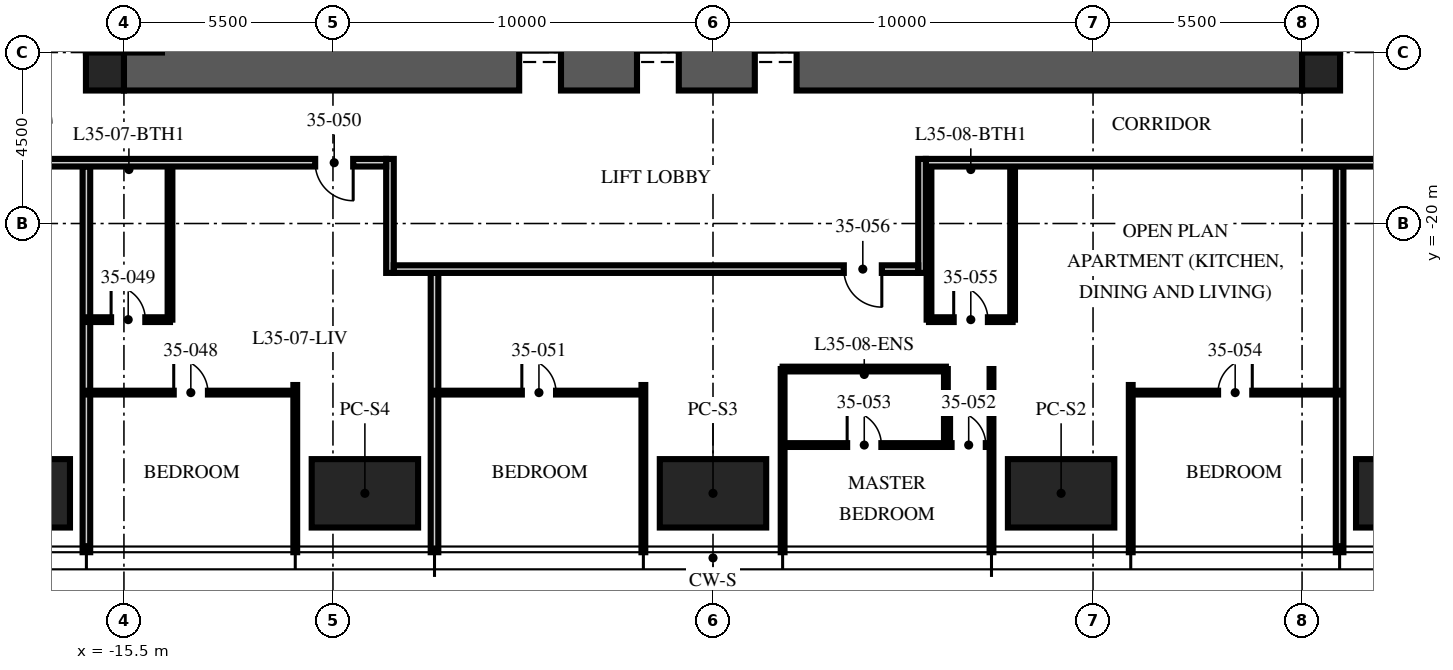
"""IFC4 building model, lengths in metres.
Left out: names, types, materials, properties, quantities, classifications, styles, units other than length and angle.
Written with IfcOpenShell. Run it as: python <this file> out.ifc"""

import sys

from ifc_helpers import new_model, si_unit, direction, frame, frame_2d, origin, origin_2d, place, context, subcontext, project, spatial, rectangle, extrude, element, fill, save


model = new_model("IFC4")
c1 = context("Model", 3, precision=1e-05, world=origin(), true_north=direction((0.0, 1.0)))
c2 = subcontext(c1, "Body", "Model", "MODEL_VIEW")
j1 = project(units=[si_unit("LENGTHUNIT", "METRE"), si_unit("PLANEANGLEUNIT", "RADIAN")], contexts=[c1])
p1 = place(None, origin())
s1 = spatial("IfcSite", under=j1, at=p1, CompositionType="ELEMENT")
p2 = place(p1, origin())
s2 = spatial("IfcBuilding", under=s1, at=p2, CompositionType="ELEMENT")
p3 = place(p2, frame((0.0, 0.0, 141.0)))
s3 = spatial("IfcBuildingStorey", under=s2, at=p3, CompositionType="ELEMENT", Elevation=141.0)
p4 = place(p3, frame((-15.5, -15.5, -0.25), z_axis=(0.0, 0.0, 1.0), x_axis=(1.0, 0.0, 0.0)))
e1 = element("IfcWall", 1, at=p4, inside=s3, PredefinedType="SHEAR", context=c2, shape_type="SweptSolid", body=[
    extrude(rectangle(XDim=31.0, YDim=2.0, at=frame_2d((15.5, 0.0))), origin(), (0.0, 0.0, 1.0), 3.75),
])
p5 = place(p4, frame((10.4, 0.0, 0.25)))
e2 = element("IfcOpeningElement", 2, at=p5, cuts=e1, PredefinedType="OPENING", context=c2, shape_type="SweptSolid", body=[
    extrude(rectangle(XDim=1.1, YDim=2.1, at=frame_2d((0.55, 1.05))), frame((0.0, 1.01, 0.0), z_axis=(0.0, -1.0, 0.0), x_axis=(1.0, 0.0, 0.0)), (0.0, 0.0, 1.0), 2.02),
])
p6 = place(p4, frame((13.5, 0.0, 0.25)))
e3 = element("IfcOpeningElement", 3, at=p6, cuts=e1, PredefinedType="OPENING", context=c2, shape_type="SweptSolid", body=[
    extrude(rectangle(XDim=1.1, YDim=2.1, at=frame_2d((0.55, 1.05))), frame((0.0, 1.01, 0.0), z_axis=(0.0, -1.0, 0.0), x_axis=(1.0, 0.0, 0.0)), (0.0, 0.0, 1.0), 2.02),
])
p7 = place(p4, frame((16.6, 0.0, 0.25)))
e4 = element("IfcOpeningElement", 4, at=p7, cuts=e1, PredefinedType="OPENING", context=c2, shape_type="SweptSolid", body=[
    extrude(rectangle(XDim=1.1, YDim=2.1, at=frame_2d((0.55, 1.05))), frame((0.0, 1.01, 0.0), z_axis=(0.0, -1.0, 0.0), x_axis=(1.0, 0.0, 0.0)), (0.0, 0.0, 1.0), 2.02),
])
for number, where, z_axis, x_axis in (
    (5, (-16.0, -16.0, -0.25), (0.0, 0.0, 1.0), (1.0, 0.0, 0.0)),
    (6, (16.0, -16.0, -0.25), (0.0, 0.0, 1.0), (1.0, 0.0, 0.0)),
):
    element("IfcColumn", number, at=place(p3, frame(where, z_axis=z_axis, x_axis=x_axis)), inside=s3, PredefinedType="COLUMN", context=c2, shape_type="SweptSolid", body=[
        extrude(rectangle(XDim=1.0, YDim=1.0, at=origin_2d()), origin(), (0.0, 0.0, 1.0), 3.75),
    ])
for number, where, z_axis, x_axis in (
    (7, (18.32, -27.1, 0.0), (0.0, 0.0, 1.0), (1.0, 0.0, 0.0)),
    (8, (9.16, -27.1, 0.0), (0.0, 0.0, 1.0), (1.0, 0.0, 0.0)),
    (9, (0.0, -27.1, 0.0), (0.0, 0.0, 1.0), (1.0, 0.0, 0.0)),
    (10, (-9.16, -27.1, 0.0), (0.0, 0.0, 1.0), (1.0, 0.0, 0.0)),
    (11, (-18.32, -27.1, 0.0), (0.0, 0.0, 1.0), (1.0, 0.0, 0.0)),
):
    element("IfcColumn", number, at=place(p3, frame(where, z_axis=z_axis, x_axis=x_axis)), inside=s3, PredefinedType="COLUMN", context=c2, shape_type="SweptSolid", body=[
        extrude(rectangle(XDim=2.8, YDim=1.8, at=origin_2d()), origin(), (0.0, 0.0, 1.0), 3.75),
    ])
p8 = place(p3, frame((-16.488, -18.5, 0.0), z_axis=(0.0, 0.0, 1.0), x_axis=(0.0, -1.0, 0.0)))
e12 = element("IfcWall", 12, at=p8, inside=s3, PredefinedType="PARTITIONING", context=c2, shape_type="SweptSolid", body=[
    extrude(rectangle(XDim=10.15, YDim=0.2, at=frame_2d((5.075, 0.0))), origin(), (0.0, 0.0, 1.0), 2.81),
])
p9 = place(p3, frame((-10.992, -24.25, 0.0), z_axis=(0.0, 0.0, 1.0), x_axis=(0.0, -1.0, 0.0)))
e13 = element("IfcWall", 13, at=p9, inside=s3, PredefinedType="PARTITIONING", context=c2, shape_type="SweptSolid", body=[
    extrude(rectangle(XDim=4.4, YDim=0.1, at=frame_2d((2.2, 0.0))), origin(), (0.0, 0.0, 1.0), 2.81),
])
p10 = place(p3, frame((-7.328, -21.3, 0.0), z_axis=(0.0, 0.0, 1.0), x_axis=(0.0, -1.0, 0.0)))
e14 = element("IfcWall", 14, at=p10, inside=s3, PredefinedType="PARTITIONING", context=c2, shape_type="SweptSolid", body=[
    extrude(rectangle(XDim=7.35, YDim=0.2, at=frame_2d((3.675, 0.0))), origin(), (0.0, 0.0, 1.0), 2.81),
])
p11 = place(p3, frame((-1.832, -24.25, 0.0), z_axis=(0.0, 0.0, 1.0), x_axis=(0.0, -1.0, 0.0)))
e15 = element("IfcWall", 15, at=p11, inside=s3, PredefinedType="PARTITIONING", context=c2, shape_type="SweptSolid", body=[
    extrude(rectangle(XDim=4.4, YDim=0.1, at=frame_2d((2.2, 0.0))), origin(), (0.0, 0.0, 1.0), 2.81),
])
for number, where, z_axis, x_axis in (
    (16, (1.832, -23.83, 0.0), (0.0, 0.0, 1.0), (0.0, -1.0, 0.0)),
    (17, (7.328, -23.83, 0.0), (0.0, 0.0, 1.0), (0.0, -1.0, 0.0)),
):
    element("IfcWall", number, at=place(p3, frame(where, z_axis=z_axis, x_axis=x_axis)), inside=s3, PredefinedType="PARTITIONING", context=c2, shape_type="SweptSolid", body=[
        extrude(rectangle(XDim=4.82, YDim=0.1, at=frame_2d((2.41, 0.0))), origin(), (0.0, 0.0, 1.0), 2.81),
    ])
p12 = place(p3, frame((10.992, -24.25, 0.0), z_axis=(0.0, 0.0, 1.0), x_axis=(0.0, -1.0, 0.0)))
e18 = element("IfcWall", 18, at=p12, inside=s3, PredefinedType="PARTITIONING", context=c2, shape_type="SweptSolid", body=[
    extrude(rectangle(XDim=4.4, YDim=0.1, at=frame_2d((2.2, 0.0))), origin(), (0.0, 0.0, 1.0), 2.81),
])
p13 = place(p3, frame((16.488, -18.5, 0.0), z_axis=(0.0, 0.0, 1.0), x_axis=(0.0, -1.0, 0.0)))
e19 = element("IfcWall", 19, at=p13, inside=s3, PredefinedType="PARTITIONING", context=c2, shape_type="SweptSolid", body=[
    extrude(rectangle(XDim=10.15, YDim=0.2, at=frame_2d((5.075, 0.0))), origin(), (0.0, 0.0, 1.0), 2.81),
])
p14 = place(p3, frame((-16.488, -24.45, 0.0), z_axis=(0.0, 0.0, 1.0), x_axis=(1.0, 0.0, 0.0)))
e20 = element("IfcWall", 20, at=p14, inside=s3, PredefinedType="PARTITIONING", context=c2, shape_type="SweptSolid", body=[
    extrude(rectangle(XDim=5.496, YDim=0.1, at=frame_2d((2.748, 0.0))), origin(), (0.0, 0.0, 1.0), 2.81),
])
p15 = place(p14, frame((2.298, 0.0, 0.0)))
e21 = element("IfcOpeningElement", 21, at=p15, cuts=e20, PredefinedType="OPENING", context=c2, shape_type="SweptSolid", body=[
    extrude(rectangle(XDim=0.9, YDim=2.1, at=frame_2d((0.45, 1.05))), frame((0.0, 0.06, 0.0), z_axis=(0.0, -1.0, 0.0), x_axis=(1.0, 0.0, 0.0)), (0.0, 0.0, 1.0), 0.12),
])
p16 = place(p3, frame((-16.488, -22.53, 0.0), z_axis=(0.0, 0.0, 1.0), x_axis=(1.0, 0.0, 0.0)))
e22 = element("IfcWall", 22, at=p16, inside=s3, PredefinedType="PARTITIONING", context=c2, shape_type="SweptSolid", body=[
    extrude(rectangle(XDim=2.2, YDim=0.125, at=frame_2d((1.1, 0.0))), origin(), (0.0, 0.0, 1.0), 3.5),
])
p17 = place(p16, frame((0.65, 0.0, 0.0)))
e23 = element("IfcOpeningElement", 23, at=p17, cuts=e22, PredefinedType="OPENING", context=c2, shape_type="SweptSolid", body=[
    extrude(rectangle(XDim=0.9, YDim=2.1, at=frame_2d((0.45, 1.05))), frame((0.0, 0.073, 0.0), z_axis=(0.0, -1.0, 0.0), x_axis=(1.0, 0.0, 0.0)), (0.0, 0.0, 1.0), 0.145),
])
p18 = place(p3, frame((-14.288, -18.5, 0.0), z_axis=(0.0, 0.0, 1.0), x_axis=(0.0, -1.0, 0.0)))
e24 = element("IfcWall", 24, at=p18, inside=s3, PredefinedType="PARTITIONING", context=c2, shape_type="SweptSolid", body=[
    extrude(rectangle(XDim=4.03, YDim=0.125, at=frame_2d((2.015, 0.0))), origin(), (0.0, 0.0, 1.0), 3.5),
])
p19 = place(p3, frame((-7.328, -24.45, 0.0), z_axis=(0.0, 0.0, 1.0), x_axis=(1.0, 0.0, 0.0)))
e25 = element("IfcWall", 25, at=p19, inside=s3, PredefinedType="PARTITIONING", context=c2, shape_type="SweptSolid", body=[
    extrude(rectangle(XDim=5.496, YDim=0.1, at=frame_2d((2.748, 0.0))), origin(), (0.0, 0.0, 1.0), 2.81),
])
p20 = place(p19, frame((2.298, 0.0, 0.0)))
e26 = element("IfcOpeningElement", 26, at=p20, cuts=e25, PredefinedType="OPENING", context=c2, shape_type="SweptSolid", body=[
    extrude(rectangle(XDim=0.9, YDim=2.1, at=frame_2d((0.45, 1.05))), frame((0.0, 0.06, 0.0), z_axis=(0.0, -1.0, 0.0), x_axis=(1.0, 0.0, 0.0)), (0.0, 0.0, 1.0), 0.12),
])
p21 = place(p3, frame((1.832, -25.83, 0.0), z_axis=(0.0, 0.0, 1.0), x_axis=(1.0, 0.0, 0.0)))
e27 = element("IfcWall", 27, at=p21, inside=s3, PredefinedType="PARTITIONING", context=c2, shape_type="SweptSolid", body=[
    extrude(rectangle(XDim=5.496, YDim=0.1, at=frame_2d((2.748, 0.0))), origin(), (0.0, 0.0, 1.0), 2.81),
])
p22 = place(p21, frame((4.446, 0.0, 0.0)))
e28 = element("IfcOpeningElement", 28, at=p22, cuts=e27, PredefinedType="OPENING", context=c2, shape_type="SweptSolid", body=[
    extrude(rectangle(XDim=0.9, YDim=2.1, at=frame_2d((0.45, 1.05))), frame((0.0, 0.06, 0.0), z_axis=(0.0, -1.0, 0.0), x_axis=(1.0, 0.0, 0.0)), (0.0, 0.0, 1.0), 0.12),
])
p23 = place(p21, frame((1.698, 0.0, 0.0)))
e29 = element("IfcOpeningElement", 29, at=p23, cuts=e27, PredefinedType="OPENING", context=c2, shape_type="SweptSolid", body=[
    extrude(rectangle(XDim=0.9, YDim=2.1, at=frame_2d((0.45, 1.05))), frame((0.0, 0.06, 0.0), z_axis=(0.0, -1.0, 0.0), x_axis=(1.0, 0.0, 0.0)), (0.0, 0.0, 1.0), 0.12),
])
p24 = place(p3, frame((6.128, -23.83, 0.0), z_axis=(0.0, 0.0, 1.0), x_axis=(0.0, -1.0, 0.0)))
e30 = element("IfcWall", 30, at=p24, inside=s3, PredefinedType="PARTITIONING", context=c2, shape_type="SweptSolid", body=[
    extrude(rectangle(XDim=2.0, YDim=0.1, at=frame_2d((1.0, 0.0))), origin(), (0.0, 0.0, 1.0), 3.5),
])
p25 = place(p3, frame((1.832, -23.83, 0.0), z_axis=(0.0, 0.0, 1.0), x_axis=(1.0, 0.0, 0.0)))
e31 = element("IfcWall", 31, at=p25, inside=s3, PredefinedType="PARTITIONING", context=c2, shape_type="SweptSolid", body=[
    extrude(rectangle(XDim=4.296, YDim=0.125, at=frame_2d((2.148, 0.0))), origin(), (0.0, 0.0, 1.0), 2.81),
])
p26 = place(p3, frame((10.992, -24.45, 0.0), z_axis=(0.0, 0.0, 1.0), x_axis=(1.0, 0.0, 0.0)))
e32 = element("IfcWall", 32, at=p26, inside=s3, PredefinedType="PARTITIONING", context=c2, shape_type="SweptSolid", body=[
    extrude(rectangle(XDim=5.496, YDim=0.1, at=frame_2d((2.748, 0.0))), origin(), (0.0, 0.0, 1.0), 2.81),
])
p27 = place(p26, frame((2.298, 0.0, 0.0)))
e33 = element("IfcOpeningElement", 33, at=p27, cuts=e32, PredefinedType="OPENING", context=c2, shape_type="SweptSolid", body=[
    extrude(rectangle(XDim=0.9, YDim=2.1, at=frame_2d((0.45, 1.05))), frame((0.0, 0.06, 0.0), z_axis=(0.0, -1.0, 0.0), x_axis=(1.0, 0.0, 0.0)), (0.0, 0.0, 1.0), 0.12),
])
p28 = place(p3, frame((5.684, -22.53, 0.0), z_axis=(0.0, 0.0, 1.0), x_axis=(1.0, 0.0, 0.0)))
e34 = element("IfcWall", 34, at=p28, inside=s3, PredefinedType="PARTITIONING", context=c2, shape_type="SweptSolid", body=[
    extrude(rectangle(XDim=2.2, YDim=0.125, at=frame_2d((1.1, 0.0))), origin(), (0.0, 0.0, 1.0), 3.5),
])
p29 = place(p28, frame((0.65, 0.0, 0.0)))
e35 = element("IfcOpeningElement", 35, at=p29, cuts=e34, PredefinedType="OPENING", context=c2, shape_type="SweptSolid", body=[
    extrude(rectangle(XDim=0.9, YDim=2.1, at=frame_2d((0.45, 1.05))), frame((0.0, 0.073, 0.0), z_axis=(0.0, -1.0, 0.0), x_axis=(1.0, 0.0, 0.0)), (0.0, 0.0, 1.0), 0.145),
])
for number, where, z_axis, x_axis in (
    (36, (5.684, -18.5, 0.0), (0.0, 0.0, 1.0), (0.0, -1.0, 0.0)),
    (37, (7.884, -18.5, 0.0), (0.0, 0.0, 1.0), (0.0, -1.0, 0.0)),
):
    element("IfcWall", number, at=place(p3, frame(where, z_axis=z_axis, x_axis=x_axis)), inside=s3, PredefinedType="PARTITIONING", context=c2, shape_type="SweptSolid", body=[
        extrude(rectangle(XDim=4.03, YDim=0.125, at=frame_2d((2.015, 0.0))), origin(), (0.0, 0.0, 1.0), 3.5),
    ])
p30 = place(p3, frame((18.5, -18.4, 0.0), z_axis=(0.0, 0.0, 1.0), x_axis=(-1.0, 0.0, 0.0)))
e38 = element("IfcWall", 38, at=p30, inside=s3, PredefinedType="PARTITIONING", context=c2, shape_type="SweptSolid", body=[
    extrude(rectangle(XDim=12.9, YDim=0.2, at=frame_2d((6.45, 0.0))), origin(), (0.0, 0.0, 1.0), 2.3),
])
for number, where, z_axis, x_axis in (
    (39, (5.5, -18.3, 0.0), (0.0, 0.0, 1.0), (0.0, -1.0, 0.0)),
    (40, (-8.5, -18.3, 0.0), (0.0, 0.0, 1.0), (0.0, -1.0, 0.0)),
):
    element("IfcWall", number, at=place(p3, frame(where, z_axis=z_axis, x_axis=x_axis)), inside=s3, PredefinedType="PARTITIONING", context=c2, shape_type="SweptSolid", body=[
        extrude(rectangle(XDim=3.0, YDim=0.2, at=frame_2d((1.5, 0.0))), origin(), (0.0, 0.0, 1.0), 3.5),
    ])
p31 = place(p3, frame((5.4, -21.2, 0.0), z_axis=(0.0, 0.0, 1.0), x_axis=(-1.0, 0.0, 0.0)))
e41 = element("IfcWall", 41, at=p31, inside=s3, PredefinedType="PARTITIONING", context=c2, shape_type="SweptSolid", body=[
    extrude(rectangle(XDim=13.8, YDim=0.2, at=frame_2d((6.9, 0.0))), origin(), (0.0, 0.0, 1.0), 2.7),
])
p32 = place(p31, frame((0.958, 0.0, 0.0)))
e42 = element("IfcOpeningElement", 42, at=p32, cuts=e41, PredefinedType="OPENING", context=c2, shape_type="SweptSolid", body=[
    extrude(rectangle(XDim=1.0, YDim=2.2, at=frame_2d((0.5, 1.1))), frame((0.0, 0.11, 0.0), z_axis=(0.0, -1.0, 0.0), x_axis=(1.0, 0.0, 0.0)), (0.0, 0.0, 1.0), 0.22),
])
p33 = place(p3, frame((-8.6, -18.4, 0.0), z_axis=(0.0, 0.0, 1.0), x_axis=(-1.0, 0.0, 0.0)))
e43 = element("IfcWall", 43, at=p33, inside=s3, PredefinedType="PARTITIONING", context=c2, shape_type="SweptSolid", body=[
    extrude(rectangle(XDim=9.9, YDim=0.2, at=frame_2d((4.95, 0.0))), origin(), (0.0, 0.0, 1.0), 2.3),
])
p34 = place(p33, frame((0.868, 0.0, 0.0)))
e44 = element("IfcOpeningElement", 44, at=p34, cuts=e43, PredefinedType="OPENING", context=c2, shape_type="SweptSolid", body=[
    extrude(rectangle(XDim=1.0, YDim=2.2, at=frame_2d((0.5, 1.1))), frame((0.0, 0.11, 0.0), z_axis=(0.0, -1.0, 0.0), x_axis=(1.0, 0.0, 0.0)), (0.0, 0.0, 1.0), 0.22),
])
p35 = place(p5, origin())
e45 = element("IfcDoor", 45, at=p35, inside=s3, OperationType="DOUBLE_DOOR_SLIDING", PredefinedType="DOOR", context=c2, shape_type="SweptSolid", body=[
    extrude(rectangle(XDim=1.1, YDim=2.1, at=frame_2d((0.55, 1.05))), frame((0.0, 0.025, 0.0), z_axis=(0.0, -1.0, 0.0), x_axis=(1.0, 0.0, 0.0)), (0.0, 0.0, 1.0), 0.05),
])
fill(e2, e45)
p36 = place(p6, origin())
e46 = element("IfcDoor", 46, at=p36, inside=s3, OperationType="DOUBLE_DOOR_SLIDING", PredefinedType="DOOR", context=c2, shape_type="SweptSolid", body=[
    extrude(rectangle(XDim=1.1, YDim=2.1, at=frame_2d((0.55, 1.05))), frame((0.0, 0.025, 0.0), z_axis=(0.0, -1.0, 0.0), x_axis=(1.0, 0.0, 0.0)), (0.0, 0.0, 1.0), 0.05),
])
fill(e3, e46)
p37 = place(p7, origin())
e47 = element("IfcDoor", 47, at=p37, inside=s3, OperationType="DOUBLE_DOOR_SLIDING", PredefinedType="DOOR", context=c2, shape_type="SweptSolid", body=[
    extrude(rectangle(XDim=1.1, YDim=2.1, at=frame_2d((0.55, 1.05))), frame((0.0, 0.025, 0.0), z_axis=(0.0, -1.0, 0.0), x_axis=(1.0, 0.0, 0.0)), (0.0, 0.0, 1.0), 0.05),
])
fill(e4, e47)
p38 = place(p15, origin())
e48 = element("IfcDoor", 48, at=p38, inside=s3, OperationType="SINGLE_SWING_LEFT", PredefinedType="DOOR", context=c2, shape_type="SweptSolid", body=[
    extrude(rectangle(XDim=0.9, YDim=2.1, at=frame_2d((0.45, 1.05))), frame((0.0, 0.025, 0.0), z_axis=(0.0, -1.0, 0.0), x_axis=(1.0, 0.0, 0.0)), (0.0, 0.0, 1.0), 0.05),
])
fill(e21, e48)
p39 = place(p17, origin())
e49 = element("IfcDoor", 49, at=p39, inside=s3, OperationType="SINGLE_SWING_LEFT", PredefinedType="DOOR", context=c2, shape_type="SweptSolid", body=[
    extrude(rectangle(XDim=0.9, YDim=2.1, at=frame_2d((0.45, 1.05))), frame((0.0, 0.025, 0.0), z_axis=(0.0, -1.0, 0.0), x_axis=(1.0, 0.0, 0.0)), (0.0, 0.0, 1.0), 0.05),
])
fill(e23, e49)
p40 = place(p34, origin())
e50 = element("IfcDoor", 50, at=p40, inside=s3, OperationType="SINGLE_SWING_LEFT", PredefinedType="DOOR", context=c2, shape_type="SweptSolid", body=[
    extrude(rectangle(XDim=1.0, YDim=2.2, at=frame_2d((0.5, 1.1))), frame((0.0, 0.025, 0.0), z_axis=(0.0, -1.0, 0.0), x_axis=(1.0, 0.0, 0.0)), (0.0, 0.0, 1.0), 0.05),
])
fill(e44, e50)
p41 = place(p20, origin())
e51 = element("IfcDoor", 51, at=p41, inside=s3, OperationType="SINGLE_SWING_LEFT", PredefinedType="DOOR", context=c2, shape_type="SweptSolid", body=[
    extrude(rectangle(XDim=0.9, YDim=2.1, at=frame_2d((0.45, 1.05))), frame((0.0, 0.025, 0.0), z_axis=(0.0, -1.0, 0.0), x_axis=(1.0, 0.0, 0.0)), (0.0, 0.0, 1.0), 0.05),
])
fill(e26, e51)
p42 = place(p22, origin())
e52 = element("IfcDoor", 52, at=p42, inside=s3, OperationType="SINGLE_SWING_LEFT", PredefinedType="DOOR", context=c2, shape_type="SweptSolid", body=[
    extrude(rectangle(XDim=0.9, YDim=2.1, at=frame_2d((0.45, 1.05))), frame((0.0, 0.025, 0.0), z_axis=(0.0, -1.0, 0.0), x_axis=(1.0, 0.0, 0.0)), (0.0, 0.0, 1.0), 0.05),
])
fill(e28, e52)
p43 = place(p23, origin())
e53 = element("IfcDoor", 53, at=p43, inside=s3, OperationType="SINGLE_SWING_LEFT", PredefinedType="DOOR", context=c2, shape_type="SweptSolid", body=[
    extrude(rectangle(XDim=0.9, YDim=2.1, at=frame_2d((0.45, 1.05))), frame((0.0, 0.025, 0.0), z_axis=(0.0, -1.0, 0.0), x_axis=(1.0, 0.0, 0.0)), (0.0, 0.0, 1.0), 0.05),
])
fill(e29, e53)
p44 = place(p27, origin())
e54 = element("IfcDoor", 54, at=p44, inside=s3, OperationType="SINGLE_SWING_RIGHT", PredefinedType="DOOR", context=c2, shape_type="SweptSolid", body=[
    extrude(rectangle(XDim=0.9, YDim=2.1, at=frame_2d((0.45, 1.05))), frame((0.0, 0.025, 0.0), z_axis=(0.0, -1.0, 0.0), x_axis=(1.0, 0.0, 0.0)), (0.0, 0.0, 1.0), 0.05),
])
fill(e33, e54)
p45 = place(p29, origin())
e55 = element("IfcDoor", 55, at=p45, inside=s3, OperationType="SINGLE_SWING_LEFT", PredefinedType="DOOR", context=c2, shape_type="SweptSolid", body=[
    extrude(rectangle(XDim=0.9, YDim=2.1, at=frame_2d((0.45, 1.05))), frame((0.0, 0.025, 0.0), z_axis=(0.0, -1.0, 0.0), x_axis=(1.0, 0.0, 0.0)), (0.0, 0.0, 1.0), 0.05),
])
fill(e35, e55)
p46 = place(p32, origin())
e56 = element("IfcDoor", 56, at=p46, inside=s3, OperationType="SINGLE_SWING_LEFT", PredefinedType="DOOR", context=c2, shape_type="SweptSolid", body=[
    extrude(rectangle(XDim=1.0, YDim=2.2, at=frame_2d((0.5, 1.1))), frame((0.0, 0.025, 0.0), z_axis=(0.0, -1.0, 0.0), x_axis=(1.0, 0.0, 0.0)), (0.0, 0.0, 1.0), 0.05),
])
fill(e42, e56)
save(model, sys.argv[1])
